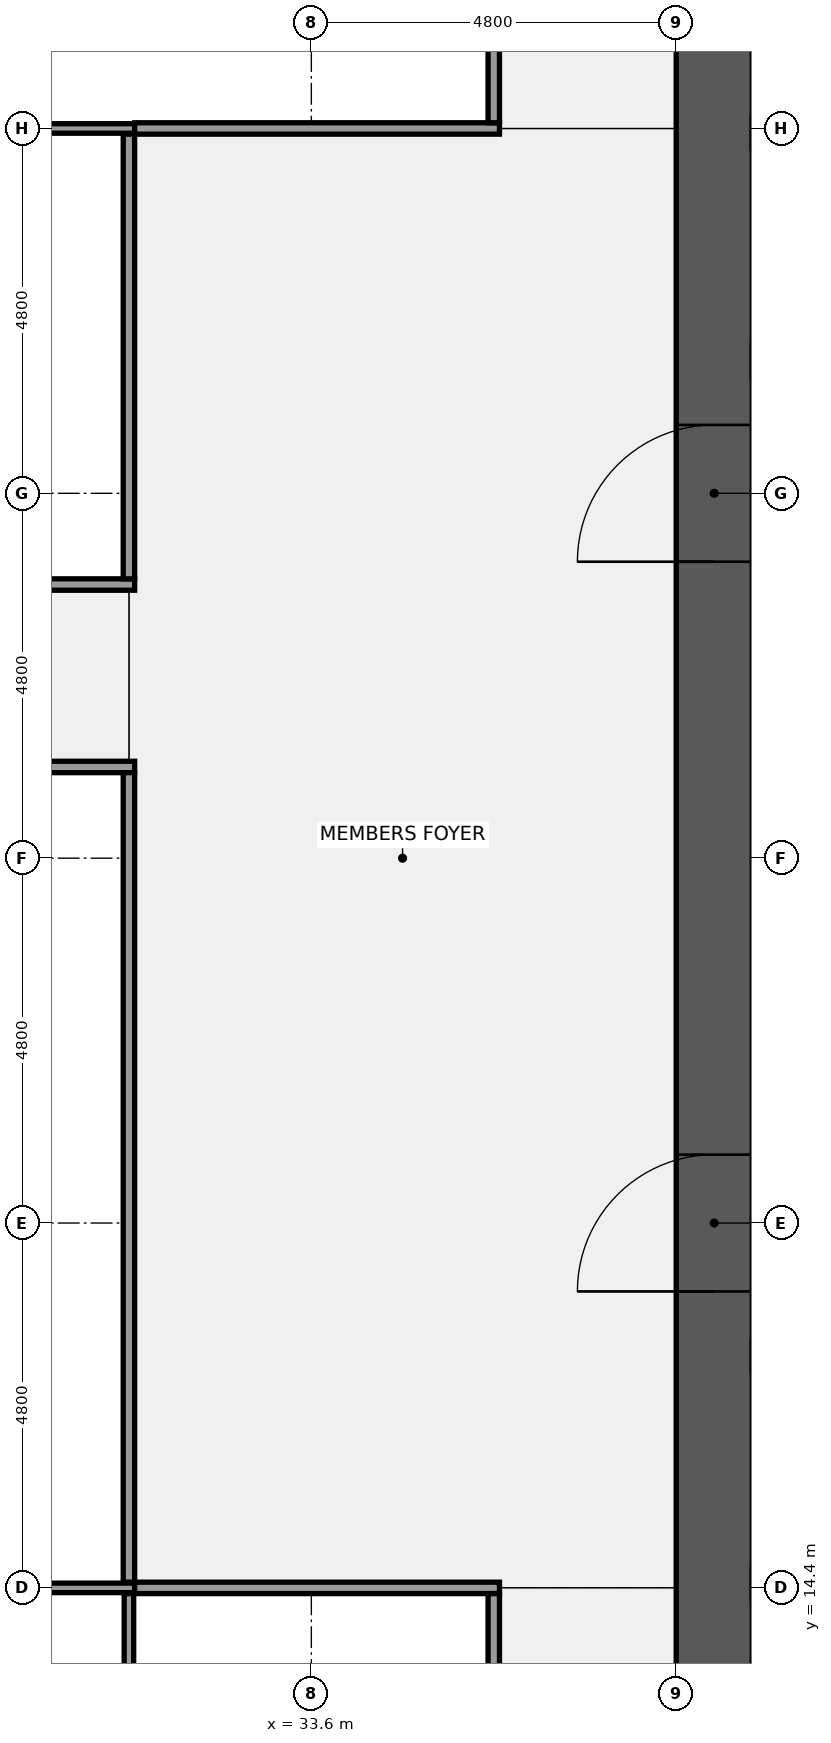
"""IFC4 building model, lengths in metres.
Left out: names, types, materials, properties, quantities, classifications, styles, units other than length and angle.
Written with IfcOpenShell. Run it as: python <this file> out.ifc"""

import sys

from ifc_helpers import new_model, si_unit, direction, frame, frame_2d, origin, place, context, subcontext, project, spatial, rectangle, extrude, element, fill, save


model = new_model("IFC4")
c1 = context("Model", 3, precision=1e-05, world=origin(), true_north=direction((0.0, 1.0)))
c2 = subcontext(c1, "Body", "Model", "MODEL_VIEW")
j1 = project(units=[si_unit("LENGTHUNIT", "METRE"), si_unit("PLANEANGLEUNIT", "RADIAN")], contexts=[c1])
p1 = place(None, origin())
s1 = spatial("IfcSite", under=j1, at=p1, CompositionType="ELEMENT")
p2 = place(p1, origin())
s2 = spatial("IfcBuilding", under=s1, at=p2, CompositionType="ELEMENT")
p3 = place(p2, frame((0.0, 0.0, 128.1)))
s3 = spatial("IfcBuildingStorey", under=s2, at=p3, CompositionType="ELEMENT", Elevation=128.1)
p4 = place(p3, frame((38.9, 9.6, 0.0), z_axis=(0.0, 0.0, 1.0), x_axis=(0.0, 1.0, 0.0)))
e1 = element("IfcWall", 1, at=p4, inside=s3, PredefinedType="SHEAR", context=c2, shape_type="SweptSolid", body=[
    extrude(rectangle(XDim=28.8, YDim=1.0, at=frame_2d((14.4, 0.0))), origin(), (0.0, 0.0, 1.0), 3.84),
])
p5 = place(p4, frame((8.7, 0.0, 0.0)))
e2 = element("IfcOpeningElement", 2, at=p5, cuts=e1, PredefinedType="OPENING", context=c2, shape_type="SweptSolid", body=[
    extrude(rectangle(XDim=1.8, YDim=2.1, at=frame_2d((0.9, 1.05))), frame((0.0, 0.51, 0.0), z_axis=(0.0, -1.0, 0.0), x_axis=(1.0, 0.0, 0.0)), (0.0, 0.0, 1.0), 1.02),
])
p6 = place(p4, frame((18.3, 0.0, 0.0)))
e3 = element("IfcOpeningElement", 3, at=p6, cuts=e1, PredefinedType="OPENING", context=c2, shape_type="SweptSolid", body=[
    extrude(rectangle(XDim=1.8, YDim=2.1, at=frame_2d((0.9, 1.05))), frame((0.0, 0.51, 0.0), z_axis=(0.0, -1.0, 0.0), x_axis=(1.0, 0.0, 0.0)), (0.0, 0.0, 1.0), 1.02),
])
p7 = place(p3, frame((26.475, 14.4, 0.0), z_axis=(0.0, 0.0, 1.0), x_axis=(1.0, 0.0, 0.0)))
e4 = element("IfcWall", 4, at=p7, inside=s3, PredefinedType="PARTITIONING", context=c2, shape_type="SweptSolid", body=[
    extrude(rectangle(XDim=4.8, YDim=0.125, at=frame_2d((2.4, 0.0))), origin(), (0.0, 0.0, 1.0), 2.936),
])
p8 = place(p3, frame((31.275, 14.4, 0.0), z_axis=(0.0, 0.0, 1.0), x_axis=(1.0, 0.0, 0.0)))
e5 = element("IfcWall", 5, at=p8, inside=s3, PredefinedType="PARTITIONING", context=c2, shape_type="SweptSolid", body=[
    extrude(rectangle(XDim=4.8, YDim=0.15, at=frame_2d((2.4, 0.0))), origin(), (0.0, 0.0, 1.0), 2.936),
])
for number, where, z_axis, x_axis in (
    (6, (26.325, 25.2, 0.0), (0.0, 0.0, 1.0), (1.0, 0.0, 0.0)),
    (7, (26.325, 27.6, 0.0), (0.0, 0.0, 1.0), (1.0, 0.0, 0.0)),
):
    element("IfcWall", number, at=place(p3, frame(where, z_axis=z_axis, x_axis=x_axis)), inside=s3, PredefinedType="PARTITIONING", context=c2, shape_type="SweptSolid", body=[
        extrude(rectangle(XDim=4.95, YDim=0.15, at=frame_2d((2.475, 0.0))), origin(), (0.0, 0.0, 1.0), 2.936),
    ])
p9 = place(p3, frame((26.475, 33.6, 0.0), z_axis=(0.0, 0.0, 1.0), x_axis=(1.0, 0.0, 0.0)))
e8 = element("IfcWall", 8, at=p9, inside=s3, PredefinedType="PARTITIONING", context=c2, shape_type="SweptSolid", body=[
    extrude(rectangle(XDim=4.8, YDim=0.125, at=frame_2d((2.4, 0.0))), origin(), (0.0, 0.0, 1.0), 2.936),
])
p10 = place(p3, frame((31.275, 33.6, 0.0), z_axis=(0.0, 0.0, 1.0), x_axis=(1.0, 0.0, 0.0)))
e9 = element("IfcWall", 9, at=p10, inside=s3, PredefinedType="PARTITIONING", context=c2, shape_type="SweptSolid", body=[
    extrude(rectangle(XDim=4.8, YDim=0.15, at=frame_2d((2.4, 0.0))), origin(), (0.0, 0.0, 1.0), 2.936),
])
p11 = place(p3, frame((31.2, 9.675, 0.0), z_axis=(0.0, 0.0, 1.0), x_axis=(0.0, 1.0, 0.0)))
e10 = element("IfcWall", 10, at=p11, inside=s3, PredefinedType="PARTITIONING", context=c2, shape_type="SweptSolid", body=[
    extrude(rectangle(XDim=4.65, YDim=0.125, at=frame_2d((2.325, 0.0))), origin(), (0.0, 0.0, 1.0), 2.936),
])
p12 = place(p3, frame((31.2, 14.475, 0.0), z_axis=(0.0, 0.0, 1.0), x_axis=(0.0, 1.0, 0.0)))
e11 = element("IfcWall", 11, at=p12, inside=s3, PredefinedType="PARTITIONING", context=c2, shape_type="SweptSolid", body=[
    extrude(rectangle(XDim=10.65, YDim=0.15, at=frame_2d((5.325, 0.0))), origin(), (0.0, 0.0, 1.0), 2.936),
])
p13 = place(p3, frame((31.2, 27.675, 0.0), z_axis=(0.0, 0.0, 1.0), x_axis=(0.0, 1.0, 0.0)))
e12 = element("IfcWall", 12, at=p13, inside=s3, PredefinedType="PARTITIONING", context=c2, shape_type="SweptSolid", body=[
    extrude(rectangle(XDim=5.85, YDim=0.15, at=frame_2d((2.925, 0.0))), origin(), (0.0, 0.0, 1.0), 2.936),
])
for number, where, z_axis, x_axis in (
    (13, (36.0, 9.675, 0.0), (0.0, 0.0, 1.0), (0.0, 1.0, 0.0)),
    (14, (36.0, 33.675, 0.0), (0.0, 0.0, 1.0), (0.0, 1.0, 0.0)),
):
    element("IfcWall", number, at=place(p3, frame(where, z_axis=z_axis, x_axis=x_axis)), inside=s3, PredefinedType="PARTITIONING", context=c2, shape_type="SweptSolid", body=[
        extrude(rectangle(XDim=4.65, YDim=0.15, at=frame_2d((2.325, 0.0))), origin(), (0.0, 0.0, 1.0), 2.936),
    ])
p14 = place(p5, origin())
e15 = element("IfcDoor", 15, at=p14, inside=s3, OperationType="DOUBLE_DOOR_SINGLE_SWING", PredefinedType="DOOR", context=c2, shape_type="SweptSolid", body=[
    extrude(rectangle(XDim=1.8, YDim=2.1, at=frame_2d((0.9, 1.05))), frame((0.0, 0.025, 0.0), z_axis=(0.0, -1.0, 0.0), x_axis=(1.0, 0.0, 0.0)), (0.0, 0.0, 1.0), 0.05),
])
fill(e2, e15)
p15 = place(p6, origin())
e16 = element("IfcDoor", 16, at=p15, inside=s3, OperationType="DOUBLE_DOOR_SINGLE_SWING", PredefinedType="DOOR", context=c2, shape_type="SweptSolid", body=[
    extrude(rectangle(XDim=1.8, YDim=2.1, at=frame_2d((0.9, 1.05))), frame((0.0, 0.025, 0.0), z_axis=(0.0, -1.0, 0.0), x_axis=(1.0, 0.0, 0.0)), (0.0, 0.0, 1.0), 0.05),
])
fill(e3, e16)
save(model, sys.argv[1])
